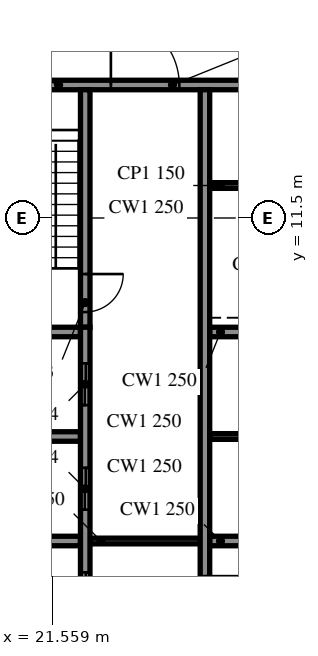
"""IFC4 building model, lengths in metres.
Left out: names, types, materials, properties, quantities, classifications, styles, units other than length and angle.
Written with IfcOpenShell. Run it as: python <this file> out.ifc"""

import sys

from ifc_helpers import new_model, si_unit, direction, frame, frame_2d, origin, place, context, subcontext, project, spatial, rectangle, extrude, element, fill, save


model = new_model("IFC4")
c1 = context("Model", 3, precision=1e-05, world=origin(), true_north=direction((0.0, 1.0)))
c2 = subcontext(c1, "Body", "Model", "MODEL_VIEW")
j1 = project(units=[si_unit("LENGTHUNIT", "METRE"), si_unit("PLANEANGLEUNIT", "RADIAN")], contexts=[c1])
p1 = place(None, origin())
s1 = spatial("IfcSite", under=j1, at=p1, CompositionType="ELEMENT")
p2 = place(p1, origin())
s2 = spatial("IfcBuilding", under=s1, at=p2, CompositionType="ELEMENT")
p3 = place(p2, frame((0.0, 0.0, 20.1)))
s3 = spatial("IfcBuildingStorey", under=s2, at=p3, CompositionType="ELEMENT", Elevation=20.1)
p4 = place(p3, frame((19.45, 15.0, 0.0), z_axis=(0.0, 0.0, 1.0), x_axis=(1.0, 0.0, 0.0)))
e1 = element("IfcWall", 1, at=p4, inside=s3, PredefinedType="SOLIDWALL", context=c2, shape_type="SweptSolid", body=[
    extrude(rectangle(XDim=9.1, YDim=0.25, at=frame_2d((4.55, 0.0))), origin(), (0.0, 0.0, 1.0), 3.96),
])
p5 = place(p4, frame((3.65, 0.0, 0.0)))
e2 = element("IfcOpeningElement", 2, at=p5, cuts=e1, PredefinedType="OPENING", context=c2, shape_type="SweptSolid", body=[
    extrude(rectangle(XDim=1.8, YDim=2.1, at=frame_2d((0.9, 1.05))), frame((0.0, 0.135, 0.0), z_axis=(0.0, -1.0, 0.0), x_axis=(1.0, 0.0, 0.0)), (0.0, 0.0, 1.0), 0.27),
])
p6 = place(p3, frame((22.425, -8.875, 0.0), z_axis=(0.0, 0.0, 1.0), x_axis=(0.0, 1.0, 0.0)))
e3 = element("IfcWall", 3, at=p6, inside=s3, PredefinedType="SOLIDWALL", context=c2, shape_type="SweptSolid", body=[
    extrude(rectangle(XDim=17.5, YDim=0.25, at=frame_2d((8.75, 0.0))), origin(), (0.0, 0.0, 1.0), 3.96),
])
p7 = place(p6, frame((7.2, 0.0, 0.0)))
e4 = element("IfcOpeningElement", 4, at=p7, cuts=e3, PredefinedType="OPENING", context=c2, shape_type="SweptSolid", body=[
    extrude(rectangle(XDim=1.1, YDim=2.1, at=frame_2d((0.55, 1.05))), frame((0.0, 0.135, 0.0), z_axis=(0.0, -1.0, 0.0), x_axis=(1.0, 0.0, 0.0)), (0.0, 0.0, 1.0), 0.27),
])
p8 = place(p6, frame((9.95, 0.0, 0.0)))
e5 = element("IfcOpeningElement", 5, at=p8, cuts=e3, PredefinedType="OPENING", context=c2, shape_type="SweptSolid", body=[
    extrude(rectangle(XDim=1.1, YDim=2.1, at=frame_2d((0.55, 1.05))), frame((0.0, 0.135, 0.0), z_axis=(0.0, -1.0, 0.0), x_axis=(1.0, 0.0, 0.0)), (0.0, 0.0, 1.0), 0.27),
])
p9 = place(p6, frame((12.7, 0.0, 0.0)))
e6 = element("IfcOpeningElement", 6, at=p9, cuts=e3, PredefinedType="OPENING", context=c2, shape_type="SweptSolid", body=[
    extrude(rectangle(XDim=1.1, YDim=2.1, at=frame_2d((0.55, 1.05))), frame((0.0, 0.135, 0.0), z_axis=(0.0, -1.0, 0.0), x_axis=(1.0, 0.0, 0.0)), (0.0, 0.0, 1.0), 0.27),
])
p10 = place(p6, frame((15.45, 0.0, 0.0)))
e7 = element("IfcOpeningElement", 7, at=p10, cuts=e3, PredefinedType="OPENING", context=c2, shape_type="SweptSolid", body=[
    extrude(rectangle(XDim=1.1, YDim=2.1, at=frame_2d((0.55, 1.05))), frame((0.0, 0.135, 0.0), z_axis=(0.0, -1.0, 0.0), x_axis=(1.0, 0.0, 0.0)), (0.0, 0.0, 1.0), 0.27),
])
p11 = place(p6, frame((0.512, 0.0, 0.0)))
e8 = element("IfcOpeningElement", 8, at=p11, cuts=e3, PredefinedType="OPENING", context=c2, shape_type="SweptSolid", body=[
    extrude(rectangle(XDim=0.9, YDim=2.1, at=frame_2d((0.45, 1.05))), frame((0.0, 0.135, 0.0), z_axis=(0.0, -1.0, 0.0), x_axis=(1.0, 0.0, 0.0)), (0.0, 0.0, 1.0), 0.27),
])
p12 = place(p6, frame((2.55, 0.0, 0.0)))
e9 = element("IfcOpeningElement", 9, at=p12, cuts=e3, PredefinedType="OPENING", context=c2, shape_type="SweptSolid", body=[
    extrude(rectangle(XDim=0.9, YDim=2.1, at=frame_2d((0.45, 1.05))), frame((0.0, 0.135, 0.0), z_axis=(0.0, -1.0, 0.0), x_axis=(1.0, 0.0, 0.0)), (0.0, 0.0, 1.0), 0.27),
])
p13 = place(p6, frame((4.587, 0.0, 0.0)))
e10 = element("IfcOpeningElement", 10, at=p13, cuts=e3, PredefinedType="OPENING", context=c2, shape_type="SweptSolid", body=[
    extrude(rectangle(XDim=0.9, YDim=2.1, at=frame_2d((0.45, 1.05))), frame((0.0, 0.135, 0.0), z_axis=(0.0, -1.0, 0.0), x_axis=(1.0, 0.0, 0.0)), (0.0, 0.0, 1.0), 0.27),
])
p14 = place(p3, frame((22.425, 14.875, 0.0), z_axis=(0.0, 0.0, 1.0), x_axis=(0.0, -1.0, 0.0)))
e11 = element("IfcWall", 11, at=p14, inside=s3, PredefinedType="SOLIDWALL", context=c2, shape_type="SweptSolid", body=[
    extrude(rectangle(XDim=6.25, YDim=0.25, at=frame_2d((3.125, 0.0))), origin(), (0.0, 0.0, 1.0), 3.96),
])
p15 = place(p14, frame((4.85, 0.0, 0.0)))
e12 = element("IfcOpeningElement", 12, at=p15, cuts=e11, PredefinedType="OPENING", context=c2, shape_type="SweptSolid", body=[
    extrude(rectangle(XDim=1.0, YDim=2.1, at=frame_2d((0.5, 1.05))), frame((0.0, 0.135, 0.0), z_axis=(0.0, -1.0, 0.0), x_axis=(1.0, 0.0, 0.0)), (0.0, 0.0, 1.0), 0.27),
])
p16 = place(p3, frame((25.575, 14.875, 0.0), z_axis=(0.0, 0.0, 1.0), x_axis=(0.0, -1.0, 0.0)))
e13 = element("IfcWall", 13, at=p16, inside=s3, PredefinedType="SOLIDWALL", context=c2, shape_type="SweptSolid", body=[
    extrude(rectangle(XDim=17.5, YDim=0.25, at=frame_2d((8.75, 0.0))), origin(), (0.0, 0.0, 1.0), 3.96),
])
p17 = place(p16, frame((15.45, 0.0, 0.0)))
e14 = element("IfcOpeningElement", 14, at=p17, cuts=e13, PredefinedType="OPENING", context=c2, shape_type="SweptSolid", body=[
    extrude(rectangle(XDim=1.1, YDim=2.1, at=frame_2d((0.55, 1.05))), frame((0.0, 0.135, 0.0), z_axis=(0.0, -1.0, 0.0), x_axis=(1.0, 0.0, 0.0)), (0.0, 0.0, 1.0), 0.27),
])
p18 = place(p16, frame((12.8, 0.0, 0.0)))
e15 = element("IfcOpeningElement", 15, at=p18, cuts=e13, PredefinedType="OPENING", context=c2, shape_type="SweptSolid", body=[
    extrude(rectangle(XDim=0.9, YDim=2.1, at=frame_2d((0.45, 1.05))), frame((0.0, 0.135, 0.0), z_axis=(0.0, -1.0, 0.0), x_axis=(1.0, 0.0, 0.0)), (0.0, 0.0, 1.0), 0.27),
])
for number, where, z_axis, x_axis in (
    (16, (19.45, 3.0, 0.0), (0.0, 0.0, 1.0), (1.0, 0.0, 0.0)),
    (17, (19.45, 5.75, 0.0), (0.0, 0.0, 1.0), (1.0, 0.0, 0.0)),
    (18, (19.45, 8.5, 0.0), (0.0, 0.0, 1.0), (1.0, 0.0, 0.0)),
    (19, (25.7, 3.0, 0.0), (0.0, 0.0, 1.0), (1.0, 0.0, 0.0)),
    (20, (25.7, 8.5, 0.0), (0.0, 0.0, 1.0), (1.0, 0.0, 0.0)),
):
    element("IfcWall", number, at=place(p3, frame(where, z_axis=z_axis, x_axis=x_axis)), inside=s3, PredefinedType="SOLIDWALL", context=c2, shape_type="SweptSolid", body=[
        extrude(rectangle(XDim=2.85, YDim=0.25, at=frame_2d((1.425, 0.0))), origin(), (0.0, 0.0, 1.0), 3.96),
    ])
p19 = place(p3, frame((22.55, 3.0, 0.0), z_axis=(0.0, 0.0, 1.0), x_axis=(1.0, 0.0, 0.0)))
e21 = element("IfcWall", 21, at=p19, inside=s3, PredefinedType="PARTITIONING", context=c2, shape_type="SweptSolid", body=[
    extrude(rectangle(XDim=2.9, YDim=0.15, at=frame_2d((1.45, 0.0))), origin(), (0.0, 0.0, 1.0), 3.96),
])
for number, where, z_axis, x_axis in (
    (22, (25.7, 5.75, 0.0), (0.0, 0.0, 1.0), (1.0, 0.0, 0.0)),
    (23, (25.7, 12.355, 0.0), (0.0, 0.0, 1.0), (1.0, 0.0, 0.0)),
):
    element("IfcWall", number, at=place(p3, frame(where, z_axis=z_axis, x_axis=x_axis)), inside=s3, PredefinedType="PARTITIONING", context=c2, shape_type="SweptSolid", body=[
        extrude(rectangle(XDim=2.85, YDim=0.15, at=frame_2d((1.425, 0.0))), origin(), (0.0, 0.0, 1.0), 3.96),
    ])
p20 = place(p5, origin())
e24 = element("IfcDoor", 24, at=p20, inside=s3, OperationType="DOUBLE_DOOR_SINGLE_SWING", PredefinedType="DOOR", context=c2, shape_type="SweptSolid", body=[
    extrude(rectangle(XDim=1.8, YDim=2.1, at=frame_2d((0.9, 1.05))), frame((0.0, 0.025, 0.0), z_axis=(0.0, -1.0, 0.0), x_axis=(1.0, 0.0, 0.0)), (0.0, 0.0, 1.0), 0.05),
])
fill(e2, e24)
p21 = place(p8, origin())
e25 = element("IfcDoor", 25, at=p21, inside=s3, OperationType="DOUBLE_DOOR_SLIDING", PredefinedType="DOOR", context=c2, shape_type="SweptSolid", body=[
    extrude(rectangle(XDim=1.1, YDim=2.1, at=frame_2d((0.55, 1.05))), frame((0.0, 0.025, 0.0), z_axis=(0.0, -1.0, 0.0), x_axis=(1.0, 0.0, 0.0)), (0.0, 0.0, 1.0), 0.05),
])
fill(e5, e25)
p22 = place(p9, origin())
e26 = element("IfcDoor", 26, at=p22, inside=s3, OperationType="DOUBLE_DOOR_SLIDING", PredefinedType="DOOR", context=c2, shape_type="SweptSolid", body=[
    extrude(rectangle(XDim=1.1, YDim=2.1, at=frame_2d((0.55, 1.05))), frame((0.0, 0.025, 0.0), z_axis=(0.0, -1.0, 0.0), x_axis=(1.0, 0.0, 0.0)), (0.0, 0.0, 1.0), 0.05),
])
fill(e6, e26)
p23 = place(p10, origin())
e27 = element("IfcDoor", 27, at=p23, inside=s3, OperationType="DOUBLE_DOOR_SLIDING", PredefinedType="DOOR", context=c2, shape_type="SweptSolid", body=[
    extrude(rectangle(XDim=1.1, YDim=2.1, at=frame_2d((0.55, 1.05))), frame((0.0, 0.025, 0.0), z_axis=(0.0, -1.0, 0.0), x_axis=(1.0, 0.0, 0.0)), (0.0, 0.0, 1.0), 0.05),
])
fill(e7, e27)
p24 = place(p15, origin())
e28 = element("IfcDoor", 28, at=p24, inside=s3, OperationType="SINGLE_SWING_LEFT", PredefinedType="DOOR", context=c2, shape_type="SweptSolid", body=[
    extrude(rectangle(XDim=1.0, YDim=2.1, at=frame_2d((0.5, 1.05))), frame((0.0, 0.025, 0.0), z_axis=(0.0, -1.0, 0.0), x_axis=(1.0, 0.0, 0.0)), (0.0, 0.0, 1.0), 0.05),
])
fill(e12, e28)
save(model, sys.argv[1])
